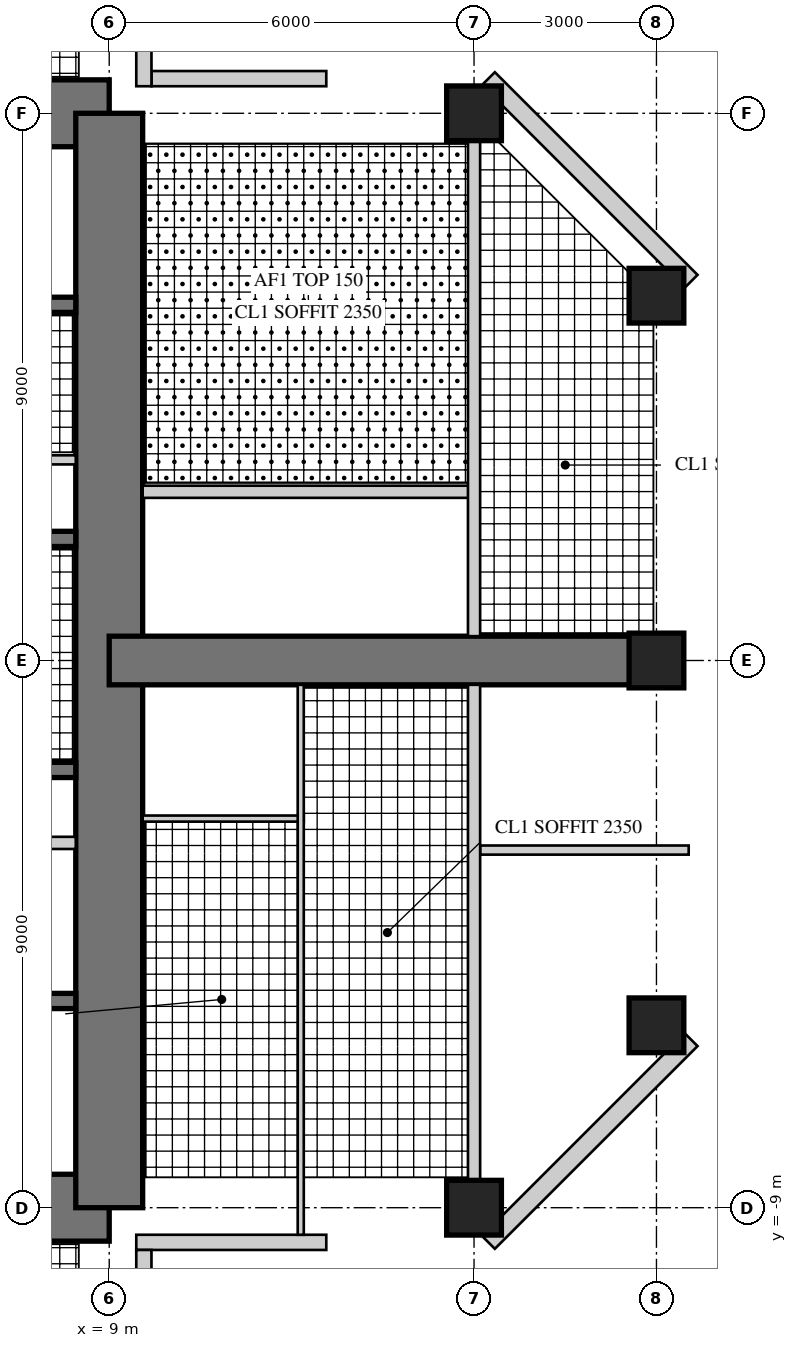
"""IFC4 building model, lengths in metres.
Left out: names, types, materials, properties, quantities, classifications, styles, units other than length and angle.
Written with IfcOpenShell. Run it as: python <this file> out.ifc"""

import sys

from ifc_helpers import new_model, si_unit, direction, frame, frame_2d, origin, origin_2d, place, context, subcontext, project, spatial, rectangle, hollow_rectangle, extrude, element, fill, save


model = new_model("IFC4")
c1 = context("Model", 3, precision=1e-05, world=origin(), true_north=direction((0.0, 1.0)))
c2 = subcontext(c1, "Body", "Model", "MODEL_VIEW")
j1 = project(units=[si_unit("LENGTHUNIT", "METRE"), si_unit("PLANEANGLEUNIT", "RADIAN")], contexts=[c1])
p1 = place(None, origin())
s1 = spatial("IfcSite", under=j1, at=p1, CompositionType="ELEMENT")
p2 = place(p1, origin())
s2 = spatial("IfcBuilding", under=s1, at=p2, CompositionType="ELEMENT")
p3 = place(p2, frame((0.0, 0.0, 206.9)))
s3 = spatial("IfcBuildingStorey", under=s2, at=p3, CompositionType="ELEMENT", Elevation=206.9)
p4 = place(p3, frame((9.0, 9.0, 0.0), z_axis=(0.0, 0.0, 1.0), x_axis=(-1.0, 0.0, 0.0)))
e1 = element("IfcWall", 1, at=p4, inside=s3, PredefinedType="SHEAR", context=c2, shape_type="SweptSolid", body=[
    extrude(rectangle(XDim=18.0, YDim=1.1, at=frame_2d((9.0, 0.0))), origin(), (0.0, 0.0, 1.0), 3.4),
])
p5 = place(p4, frame((9.8, 0.0, 0.0)))
e2 = element("IfcOpeningElement", 2, at=p5, cuts=e1, PredefinedType="OPENING", context=c2, shape_type="SweptSolid", body=[
    extrude(rectangle(XDim=1.0, YDim=2.4, at=frame_2d((0.5, 1.2))), frame((0.0, 0.56, 0.0), z_axis=(0.0, -1.0, 0.0), x_axis=(1.0, 0.0, 0.0)), (0.0, 0.0, 1.0), 1.12),
])
p6 = place(p3, frame((-9.0, -9.0, 0.0), z_axis=(0.0, 0.0, 1.0), x_axis=(1.0, 0.0, 0.0)))
e3 = element("IfcWall", 3, at=p6, inside=s3, PredefinedType="SHEAR", context=c2, shape_type="SweptSolid", body=[
    extrude(rectangle(XDim=18.0, YDim=1.1, at=frame_2d((9.0, 0.0))), origin(), (0.0, 0.0, 1.0), 3.4),
])
p7 = place(p6, frame((9.8, 0.0, 0.0)))
e4 = element("IfcOpeningElement", 4, at=p7, cuts=e3, PredefinedType="OPENING", context=c2, shape_type="SweptSolid", body=[
    extrude(rectangle(XDim=1.0, YDim=2.4, at=frame_2d((0.5, 1.2))), frame((0.0, 0.56, 0.0), z_axis=(0.0, -1.0, 0.0), x_axis=(1.0, 0.0, 0.0)), (0.0, 0.0, 1.0), 1.12),
])
p8 = place(p3, frame((9.0, -9.0, 0.0), z_axis=(0.0, 0.0, 1.0), x_axis=(0.0, 1.0, 0.0)))
e5 = element("IfcWall", 5, at=p8, inside=s3, PredefinedType="SHEAR", context=c2, shape_type="SweptSolid", body=[
    extrude(rectangle(XDim=18.0, YDim=1.1, at=frame_2d((9.0, 0.0))), origin(), (0.0, 0.0, 1.0), 3.4),
])
p9 = place(p8, frame((9.8, 0.0, 0.0)))
e6 = element("IfcOpeningElement", 6, at=p9, cuts=e5, PredefinedType="OPENING", context=c2, shape_type="SweptSolid", body=[
    extrude(rectangle(XDim=1.0, YDim=2.4, at=frame_2d((0.5, 1.2))), frame((0.0, 0.56, 0.0), z_axis=(0.0, -1.0, 0.0), x_axis=(1.0, 0.0, 0.0)), (0.0, 0.0, 1.0), 1.12),
])
p10 = place(p3, frame((1.925, 2.0, 0.0), z_axis=(0.0, 0.0, 1.0), x_axis=(1.0, 0.0, 0.0)))
e7 = element("IfcWall", 7, at=p10, inside=s3, PredefinedType="SHEAR", context=c2, shape_type="SweptSolid", body=[
    extrude(rectangle(XDim=6.525, YDim=0.25, at=frame_2d((3.262, 0.0))), origin(), (0.0, 0.0, 1.0), 3.4),
])
p11 = place(p3, frame((1.925, 5.85, 0.0), z_axis=(0.0, 0.0, 1.0), x_axis=(1.0, 0.0, 0.0)))
e8 = element("IfcWall", 8, at=p11, inside=s3, PredefinedType="SHEAR", context=c2, shape_type="SweptSolid", body=[
    extrude(rectangle(XDim=6.525, YDim=0.25, at=frame_2d((3.262, 0.0))), origin(), (0.0, 0.0, 1.0), 3.4),
])
p12 = place(p11, frame((0.521, 0.0, 0.0)))
e9 = element("IfcOpeningElement", 9, at=p12, cuts=e8, PredefinedType="OPENING", context=c2, shape_type="SweptSolid", body=[
    extrude(rectangle(XDim=1.0, YDim=2.1, at=frame_2d((0.5, 1.05))), frame((0.0, 0.135, 0.0), z_axis=(0.0, -1.0, 0.0), x_axis=(1.0, 0.0, 0.0)), (0.0, 0.0, 1.0), 0.27),
])
p13 = place(p3, frame((1.925, 3.3, 0.0), z_axis=(0.0, 0.0, 1.0), x_axis=(1.0, 0.0, 0.0)))
e10 = element("IfcWall", 10, at=p13, inside=s3, PredefinedType="PARTITIONING", context=c2, shape_type="SweptSolid", body=[
    extrude(rectangle(XDim=6.525, YDim=0.15, at=frame_2d((3.262, 0.0))), origin(), (0.0, 0.0, 1.0), 3.4),
])
p14 = place(p13, frame((0.075, 0.0, 0.0)))
e11 = element("IfcOpeningElement", 11, at=p14, cuts=e10, PredefinedType="OPENING", context=c2, shape_type="SweptSolid", body=[
    extrude(rectangle(XDim=0.8, YDim=2.1, at=frame_2d((0.4, 1.05))), frame((0.0, 0.085, 0.0), z_axis=(0.0, -1.0, 0.0), x_axis=(1.0, 0.0, 0.0)), (0.0, 0.0, 1.0), 0.17),
])
p15 = place(p13, frame((3.675, 0.0, 0.0)))
e12 = element("IfcOpeningElement", 12, at=p15, cuts=e10, PredefinedType="OPENING", context=c2, shape_type="SweptSolid", body=[
    extrude(rectangle(XDim=0.8, YDim=2.1, at=frame_2d((0.4, 1.05))), frame((0.0, 0.085, 0.0), z_axis=(0.0, -1.0, 0.0), x_axis=(1.0, 0.0, 0.0)), (0.0, 0.0, 1.0), 0.17),
])
p16 = place(p3, frame((2.125, -1.8, 0.0), z_axis=(0.0, 0.0, 1.0), x_axis=(1.0, 0.0, 0.0)))
e13 = element("IfcWall", 13, at=p16, inside=s3, PredefinedType="SHEAR", context=c2, shape_type="SweptSolid", body=[
    extrude(rectangle(XDim=6.325, YDim=0.25, at=frame_2d((3.163, 0.0))), origin(), (0.0, 0.0, 1.0), 3.4),
])
p17 = place(p3, frame((2.125, -5.6, 0.0), z_axis=(0.0, 0.0, 1.0), x_axis=(1.0, 0.0, 0.0)))
e14 = element("IfcWall", 14, at=p17, inside=s3, PredefinedType="SHEAR", context=c2, shape_type="SweptSolid", body=[
    extrude(rectangle(XDim=6.325, YDim=0.25, at=frame_2d((3.163, 0.0))), origin(), (0.0, 0.0, 1.0), 3.4),
])
p18 = place(p17, frame((0.175, 0.0, 0.0)))
e15 = element("IfcOpeningElement", 15, at=p18, cuts=e14, PredefinedType="OPENING", context=c2, shape_type="SweptSolid", body=[
    extrude(rectangle(XDim=1.0, YDim=2.1, at=frame_2d((0.5, 1.05))), frame((0.0, 0.135, 0.0), z_axis=(0.0, -1.0, 0.0), x_axis=(1.0, 0.0, 0.0)), (0.0, 0.0, 1.0), 0.27),
])
p19 = place(p3, frame((5.725, -3.0, 0.0), z_axis=(0.0, 0.0, 1.0), x_axis=(1.0, 0.0, 0.0)))
e16 = element("IfcWall", 16, at=p19, inside=s3, PredefinedType="PARTITIONING", context=c2, shape_type="SweptSolid", body=[
    extrude(rectangle(XDim=2.725, YDim=0.2, at=frame_2d((1.362, 0.0))), origin(), (0.0, 0.0, 1.0), 3.4),
])
p20 = place(p3, frame((9.0, 0.0, 0.0), z_axis=(0.0, 0.0, 1.0), x_axis=(1.0, 0.0, 0.0)))
e17 = element("IfcWall", 17, at=p20, inside=s3, PredefinedType="SHEAR", context=c2, shape_type="SweptSolid", body=[
    extrude(rectangle(XDim=9.0, YDim=0.8, at=frame_2d((4.5, 0.0))), origin(), (0.0, 0.0, 1.0), 3.4),
])
p21 = place(p20, frame((3.95, 0.0, 0.0)))
e18 = element("IfcOpeningElement", 18, at=p21, cuts=e17, PredefinedType="OPENING", context=c2, shape_type="SweptSolid", body=[
    extrude(rectangle(XDim=1.0, YDim=2.15, at=frame_2d((0.5, 1.075))), frame((0.0, 0.41, 0.0), z_axis=(0.0, -1.0, 0.0), x_axis=(1.0, 0.0, 0.0)), (0.0, 0.0, 1.0), 0.82),
])
p22 = place(p20, frame((7.0, 0.0, 0.0)))
e19 = element("IfcOpeningElement", 19, at=p22, cuts=e17, PredefinedType="OPENING", context=c2, shape_type="SweptSolid", body=[
    extrude(rectangle(XDim=1.0, YDim=2.2, at=frame_2d((0.5, 1.1))), frame((0.0, 0.41, 0.0), z_axis=(0.0, -1.0, 0.0), x_axis=(1.0, 0.0, 0.0)), (0.0, 0.0, 1.0), 0.82),
])
for number, where, z_axis, x_axis in (
    (20, (15.0, -9.0, 0.0), (0.0, 0.0, 1.0), (1.0, 0.0, 0.0)),
    (21, (15.0, 9.0, 0.0), (0.0, 0.0, 1.0), (1.0, 0.0, 0.0)),
    (22, (18.0, -6.0, 0.0), (0.0, 0.0, 1.0), (1.0, 0.0, 0.0)),
    (23, (18.0, 0.0, 0.0), (0.0, 0.0, 1.0), (1.0, 0.0, 0.0)),
    (24, (18.0, 6.0, 0.0), (0.0, 0.0, 1.0), (1.0, 0.0, 0.0)),
):
    element("IfcColumn", number, at=place(p3, frame(where, z_axis=z_axis, x_axis=x_axis)), inside=s3, PredefinedType="COLUMN", context=c2, shape_type="SweptSolid", body=[
        extrude(rectangle(XDim=0.9, YDim=0.9, at=origin_2d()), origin(), (0.0, 0.0, 1.0), 3.4),
    ])
p23 = place(p3, frame((9.445, -9.57, 0.0), z_axis=(0.0, 0.0, 1.0), x_axis=(1.0, 0.0, 0.0)))
e25 = element("IfcWall", 25, at=p23, inside=s3, PredefinedType="SOLIDWALL", context=c2, shape_type="SweptSolid", body=[
    extrude(rectangle(XDim=3.125, YDim=0.25, at=frame_2d((1.562, 0.0))), origin(), (0.0, 0.0, 1.0), 3.22),
])
p24 = place(p23, frame((0.6, 0.0, 0.0)))
e26 = element("IfcOpeningElement", 26, at=p24, cuts=e25, PredefinedType="OPENING", context=c2, shape_type="SweptSolid", body=[
    extrude(rectangle(XDim=1.0, YDim=2.2, at=frame_2d((0.5, 1.1))), frame((0.0, 0.135, 0.0), z_axis=(0.0, -1.0, 0.0), x_axis=(1.0, 0.0, 0.0)), (0.0, 0.0, 1.0), 0.27),
])
p25 = place(p3, frame((15.236, -9.57, 0.0), z_axis=(0.0, 0.0, 1.0), x_axis=(0.707106781187, 0.707106781187, 0.0)))
e27 = element("IfcWall", 27, at=p25, inside=s3, PredefinedType="SOLIDWALL", context=c2, shape_type="SweptSolid", body=[
    extrude(rectangle(XDim=4.715, YDim=0.3, at=frame_2d((2.357, 0.0))), origin(), (0.0, 0.0, 1.0), 3.22),
])
p26 = place(p25, frame((1.907, 0.0, 0.3)))
e28 = element("IfcOpeningElement", 28, at=p26, cuts=e27, PredefinedType="OPENING", context=c2, shape_type="SweptSolid", body=[
    extrude(rectangle(XDim=0.9, YDim=2.4, at=frame_2d((0.45, 1.2))), frame((0.0, 0.16, 0.0), z_axis=(0.0, -1.0, 0.0), x_axis=(1.0, 0.0, 0.0)), (0.0, 0.0, 1.0), 0.32),
])
p27 = place(p3, frame((18.57, 6.236, 0.0), z_axis=(0.0, 0.0, 1.0), x_axis=(-0.707106781187, 0.707106781187, 0.0)))
e29 = element("IfcWall", 29, at=p27, inside=s3, PredefinedType="SOLIDWALL", context=c2, shape_type="SweptSolid", body=[
    extrude(rectangle(XDim=4.715, YDim=0.3, at=frame_2d((2.357, 0.0))), origin(), (0.0, 0.0, 1.0), 3.22),
])
p28 = place(p27, frame((1.907, 0.0, 0.3)))
e30 = element("IfcOpeningElement", 30, at=p28, cuts=e29, PredefinedType="OPENING", context=c2, shape_type="SweptSolid", body=[
    extrude(rectangle(XDim=0.9, YDim=2.4, at=frame_2d((0.45, 1.2))), frame((0.0, 0.16, 0.0), z_axis=(0.0, -1.0, 0.0), x_axis=(1.0, 0.0, 0.0)), (0.0, 0.0, 1.0), 0.32),
])
p29 = place(p3, frame((12.57, 9.57, 0.0), z_axis=(0.0, 0.0, 1.0), x_axis=(-1.0, 0.0, 0.0)))
e31 = element("IfcWall", 31, at=p29, inside=s3, PredefinedType="SOLIDWALL", context=c2, shape_type="SweptSolid", body=[
    extrude(rectangle(XDim=2.875, YDim=0.25, at=frame_2d((1.438, 0.0))), origin(), (0.0, 0.0, 1.0), 3.22),
])
p30 = place(p29, frame((0.6, 0.0, 0.0)))
e32 = element("IfcOpeningElement", 32, at=p30, cuts=e31, PredefinedType="OPENING", context=c2, shape_type="SweptSolid", body=[
    extrude(rectangle(XDim=1.0, YDim=2.2, at=frame_2d((0.5, 1.1))), frame((0.0, 0.135, 0.0), z_axis=(0.0, -1.0, 0.0), x_axis=(1.0, 0.0, 0.0)), (0.0, 0.0, 1.0), 0.27),
])
p31 = place(p3, frame((9.57, 9.445, 0.0), z_axis=(0.0, 0.0, 1.0), x_axis=(0.0, 1.0, 0.0)))
e33 = element("IfcWall", 33, at=p31, inside=s3, PredefinedType="SOLIDWALL", context=c2, shape_type="SweptSolid", body=[
    extrude(rectangle(XDim=3.125, YDim=0.25, at=frame_2d((1.562, 0.0))), origin(), (0.0, 0.0, 1.0), 3.22),
])
p32 = place(p31, frame((0.6, 0.0, 0.0)))
e34 = element("IfcOpeningElement", 34, at=p32, cuts=e33, PredefinedType="OPENING", context=c2, shape_type="SweptSolid", body=[
    extrude(rectangle(XDim=1.0, YDim=2.2, at=frame_2d((0.5, 1.1))), frame((0.0, 0.135, 0.0), z_axis=(0.0, -1.0, 0.0), x_axis=(1.0, 0.0, 0.0)), (0.0, 0.0, 1.0), 0.27),
])
p33 = place(p3, frame((9.57, -12.57, 0.0), z_axis=(0.0, 0.0, 1.0), x_axis=(0.0, 1.0, 0.0)))
e35 = element("IfcWall", 35, at=p33, inside=s3, PredefinedType="SOLIDWALL", context=c2, shape_type="SweptSolid", body=[
    extrude(rectangle(XDim=2.875, YDim=0.25, at=frame_2d((1.438, 0.0))), origin(), (0.0, 0.0, 1.0), 3.22),
])
p34 = place(p33, frame((0.6, 0.0, 0.0)))
e36 = element("IfcOpeningElement", 36, at=p34, cuts=e35, PredefinedType="OPENING", context=c2, shape_type="SweptSolid", body=[
    extrude(rectangle(XDim=1.0, YDim=2.2, at=frame_2d((0.5, 1.1))), frame((0.0, 0.135, 0.0), z_axis=(0.0, -1.0, 0.0), x_axis=(1.0, 0.0, 0.0)), (0.0, 0.0, 1.0), 0.27),
])
p35 = place(p3, frame((9.55, -2.6, 0.0), z_axis=(0.0, 0.0, 1.0), x_axis=(1.0, 0.0, 0.0)))
e37 = element("IfcWall", 37, at=p35, inside=s3, PredefinedType="PARTITIONING", context=c2, shape_type="SweptSolid", body=[
    extrude(rectangle(XDim=2.65, YDim=0.1, at=frame_2d((1.325, 0.0))), origin(), (0.0, 0.0, 1.0), 3.22),
])
p36 = place(p3, frame((12.15, -9.445, 0.0), z_axis=(0.0, 0.0, 1.0), x_axis=(0.0, 1.0, 0.0)))
e38 = element("IfcWall", 38, at=p36, inside=s3, PredefinedType="PARTITIONING", context=c2, shape_type="SweptSolid", body=[
    extrude(rectangle(XDim=9.045, YDim=0.1, at=frame_2d((4.522, 0.0))), origin(), (0.0, 0.0, 1.0), 3.22),
])
p37 = place(p36, frame((5.495, 0.0, 0.0)))
e39 = element("IfcOpeningElement", 39, at=p37, cuts=e38, PredefinedType="OPENING", context=c2, shape_type="SweptSolid", body=[
    extrude(rectangle(XDim=0.9, YDim=2.1, at=frame_2d((0.45, 1.05))), frame((0.0, 0.06, 0.0), z_axis=(0.0, -1.0, 0.0), x_axis=(1.0, 0.0, 0.0)), (0.0, 0.0, 1.0), 0.12),
])
p38 = place(p36, frame((7.595, 0.0, 0.0)))
e40 = element("IfcOpeningElement", 40, at=p38, cuts=e38, PredefinedType="OPENING", context=c2, shape_type="SweptSolid", body=[
    extrude(rectangle(XDim=0.9, YDim=2.1, at=frame_2d((0.45, 1.05))), frame((0.0, 0.06, 0.0), z_axis=(0.0, -1.0, 0.0), x_axis=(1.0, 0.0, 0.0)), (0.0, 0.0, 1.0), 0.12),
])
p39 = place(p3, frame((9.55, 2.775, 0.0), z_axis=(0.0, 0.0, 1.0), x_axis=(1.0, 0.0, 0.0)))
e41 = element("IfcWall", 41, at=p39, inside=s3, PredefinedType="SOLIDWALL", context=c2, shape_type="SweptSolid", body=[
    extrude(rectangle(XDim=5.45, YDim=0.2, at=frame_2d((2.725, 0.0))), origin(), (0.0, 0.0, 1.0), 3.22),
])
p40 = place(p39, frame((1.2, 0.0, 0.0)))
e42 = element("IfcOpeningElement", 42, at=p40, cuts=e41, PredefinedType="OPENING", context=c2, shape_type="SweptSolid", body=[
    extrude(rectangle(XDim=1.0, YDim=2.2, at=frame_2d((0.5, 1.1))), frame((0.0, 0.11, 0.0), z_axis=(0.0, -1.0, 0.0), x_axis=(1.0, 0.0, 0.0)), (0.0, 0.0, 1.0), 0.22),
])
p41 = place(p3, frame((15.1, -3.118, 0.0), z_axis=(0.0, 0.0, 1.0), x_axis=(1.0, 0.0, 0.0)))
e43 = element("IfcWall", 43, at=p41, inside=s3, PredefinedType="PARTITIONING", context=c2, shape_type="SweptSolid", body=[
    extrude(rectangle(XDim=3.43, YDim=0.15, at=frame_2d((1.715, 0.0))), origin(), (0.0, 0.0, 1.0), 3.22),
])
p42 = place(p41, frame((0.6, 0.0, 0.0)))
e44 = element("IfcOpeningElement", 44, at=p42, cuts=e43, PredefinedType="OPENING", context=c2, shape_type="SweptSolid", body=[
    extrude(rectangle(XDim=1.0, YDim=2.1, at=frame_2d((0.5, 1.05))), frame((0.0, 0.085, 0.0), z_axis=(0.0, -1.0, 0.0), x_axis=(1.0, 0.0, 0.0)), (0.0, 0.0, 1.0), 0.17),
])
p43 = place(p3, frame((15.0, -8.55, 0.0), z_axis=(0.0, 0.0, 1.0), x_axis=(0.0, 1.0, 0.0)))
e45 = element("IfcWall", 45, at=p43, inside=s3, PredefinedType="SOLIDWALL", context=c2, shape_type="SweptSolid", body=[
    extrude(rectangle(XDim=8.15, YDim=0.2, at=frame_2d((4.075, 0.0))), origin(), (0.0, 0.0, 1.0), 2.47),
])
p44 = place(p3, frame((15.0, 0.4, 0.0), z_axis=(0.0, 0.0, 1.0), x_axis=(0.0, 1.0, 0.0)))
e46 = element("IfcWall", 46, at=p44, inside=s3, PredefinedType="SOLIDWALL", context=c2, shape_type="SweptSolid", body=[
    extrude(rectangle(XDim=8.15, YDim=0.2, at=frame_2d((4.075, 0.0))), origin(), (0.0, 0.0, 1.0), 2.47),
])
p45 = place(p44, frame((0.4, 0.0, 0.0)))
e47 = element("IfcOpeningElement", 47, at=p45, cuts=e46, PredefinedType="OPENING", context=c2, shape_type="SweptSolid", body=[
    extrude(rectangle(XDim=1.0, YDim=2.2, at=frame_2d((0.5, 1.1))), frame((0.0, 0.11, 0.0), z_axis=(0.0, -1.0, 0.0), x_axis=(1.0, 0.0, 0.0)), (0.0, 0.0, 1.0), 0.22),
])
p46 = place(p24, origin())
e48 = element("IfcDoor", 48, at=p46, inside=s3, OperationType="SINGLE_SWING_LEFT", PredefinedType="DOOR", context=c2, shape_type="SweptSolid", body=[
    extrude(hollow_rectangle(XDim=1.0, YDim=2.2, WallThickness=0.06, at=frame_2d((0.5, 1.1))), frame((0.0, 0.025, 0.0), z_axis=(0.0, -1.0, 0.0), x_axis=(1.0, 0.0, 0.0)), (0.0, 0.0, 1.0), 0.05),
    extrude(rectangle(XDim=0.879, YDim=2.079, at=frame_2d((0.5, 1.1))), frame((0.0, 0.025, 0.0), z_axis=(0.0, -1.0, 0.0), x_axis=(1.0, 0.0, 0.0)), (0.0, 0.0, 1.0), 0.05),
])
fill(e26, e48)
p47 = place(p26, origin())
e49 = element("IfcWindow", 49, at=p47, inside=s3, PartitioningType="SINGLE_PANEL", PredefinedType="WINDOW", context=c2, shape_type="SweptSolid", body=[
    extrude(hollow_rectangle(XDim=0.9, YDim=2.4, WallThickness=0.06, at=frame_2d((0.45, 1.2))), frame((0.0, 0.03, 0.0), z_axis=(0.0, -1.0, 0.0), x_axis=(1.0, 0.0, 0.0)), (0.0, 0.0, 1.0), 0.06),
    extrude(rectangle(XDim=0.779, YDim=2.279, at=frame_2d((0.45, 1.2))), frame((0.0, 0.03, 0.0), z_axis=(0.0, -1.0, 0.0), x_axis=(1.0, 0.0, 0.0)), (0.0, 0.0, 1.0), 0.06),
])
fill(e28, e49)
p48 = place(p28, origin())
e50 = element("IfcWindow", 50, at=p48, inside=s3, PartitioningType="SINGLE_PANEL", PredefinedType="WINDOW", context=c2, shape_type="SweptSolid", body=[
    extrude(hollow_rectangle(XDim=0.9, YDim=2.4, WallThickness=0.06, at=frame_2d((0.45, 1.2))), frame((0.0, 0.03, 0.0), z_axis=(0.0, -1.0, 0.0), x_axis=(1.0, 0.0, 0.0)), (0.0, 0.0, 1.0), 0.06),
    extrude(rectangle(XDim=0.779, YDim=2.279, at=frame_2d((0.45, 1.2))), frame((0.0, 0.03, 0.0), z_axis=(0.0, -1.0, 0.0), x_axis=(1.0, 0.0, 0.0)), (0.0, 0.0, 1.0), 0.06),
])
fill(e30, e50)
p49 = place(p30, origin())
e51 = element("IfcDoor", 51, at=p49, inside=s3, OperationType="SINGLE_SWING_RIGHT", PredefinedType="DOOR", context=c2, shape_type="SweptSolid", body=[
    extrude(hollow_rectangle(XDim=1.0, YDim=2.2, WallThickness=0.06, at=frame_2d((0.5, 1.1))), frame((0.0, 0.025, 0.0), z_axis=(0.0, -1.0, 0.0), x_axis=(1.0, 0.0, 0.0)), (0.0, 0.0, 1.0), 0.05),
    extrude(rectangle(XDim=0.879, YDim=2.079, at=frame_2d((0.5, 1.1))), frame((0.0, 0.025, 0.0), z_axis=(0.0, -1.0, 0.0), x_axis=(1.0, 0.0, 0.0)), (0.0, 0.0, 1.0), 0.05),
])
fill(e32, e51)
p50 = place(p37, origin())
e52 = element("IfcDoor", 52, at=p50, inside=s3, OperationType="SINGLE_SWING_RIGHT", PredefinedType="DOOR", context=c2, shape_type="SweptSolid", body=[
    extrude(rectangle(XDim=0.9, YDim=2.1, at=frame_2d((0.45, 1.05))), frame((0.0, 0.025, 0.0), z_axis=(0.0, -1.0, 0.0), x_axis=(1.0, 0.0, 0.0)), (0.0, 0.0, 1.0), 0.05),
])
fill(e39, e52)
p51 = place(p38, origin())
e53 = element("IfcDoor", 53, at=p51, inside=s3, OperationType="SINGLE_SWING_RIGHT", PredefinedType="DOOR", context=c2, shape_type="SweptSolid", body=[
    extrude(rectangle(XDim=0.9, YDim=2.1, at=frame_2d((0.45, 1.05))), frame((0.0, 0.025, 0.0), z_axis=(0.0, -1.0, 0.0), x_axis=(1.0, 0.0, 0.0)), (0.0, 0.0, 1.0), 0.05),
])
fill(e40, e53)
p52 = place(p40, origin())
e54 = element("IfcDoor", 54, at=p52, inside=s3, OperationType="SINGLE_SWING_LEFT", PredefinedType="DOOR", context=c2, shape_type="SweptSolid", body=[
    extrude(rectangle(XDim=1.0, YDim=2.2, at=frame_2d((0.5, 1.1))), frame((0.0, 0.025, 0.0), z_axis=(0.0, -1.0, 0.0), x_axis=(1.0, 0.0, 0.0)), (0.0, 0.0, 1.0), 0.05),
])
fill(e42, e54)
p53 = place(p42, origin())
e55 = element("IfcDoor", 55, at=p53, inside=s3, OperationType="SINGLE_SWING_LEFT", PredefinedType="DOOR", context=c2, shape_type="SweptSolid", body=[
    extrude(rectangle(XDim=1.0, YDim=2.1, at=frame_2d((0.5, 1.05))), frame((0.0, 0.025, 0.0), z_axis=(0.0, -1.0, 0.0), x_axis=(1.0, 0.0, 0.0)), (0.0, 0.0, 1.0), 0.05),
])
fill(e44, e55)
p54 = place(p45, frame((1.0, 0.0, 0.0), z_axis=(0.0, 0.0, 1.0), x_axis=(-1.0, 0.0, 0.0)))
e56 = element("IfcDoor", 56, at=p54, inside=s3, OperationType="SINGLE_SWING_RIGHT", PredefinedType="DOOR", context=c2, shape_type="SweptSolid", body=[
    extrude(rectangle(XDim=1.0, YDim=2.2, at=frame_2d((0.5, 1.1))), frame((0.0, 0.025, 0.0), z_axis=(0.0, -1.0, 0.0), x_axis=(1.0, 0.0, 0.0)), (0.0, 0.0, 1.0), 0.05),
])
fill(e47, e56)
p55 = place(p21, frame((1.0, 0.0, 0.0), z_axis=(0.0, 0.0, 1.0), x_axis=(-1.0, 0.0, 0.0)))
e57 = element("IfcDoor", 57, at=p55, inside=s3, OperationType="SINGLE_SWING_RIGHT", PredefinedType="DOOR", context=c2, shape_type="SweptSolid", body=[
    extrude(rectangle(XDim=1.0, YDim=2.15, at=frame_2d((0.5, 1.075))), frame((0.0, 0.025, 0.0), z_axis=(0.0, -1.0, 0.0), x_axis=(1.0, 0.0, 0.0)), (0.0, 0.0, 1.0), 0.05),
])
fill(e18, e57)
p56 = place(p22, frame((1.0, 0.0, 0.0), z_axis=(0.0, 0.0, 1.0), x_axis=(-1.0, 0.0, 0.0)))
e58 = element("IfcDoor", 58, at=p56, inside=s3, OperationType="SINGLE_SWING_RIGHT", PredefinedType="DOOR", context=c2, shape_type="SweptSolid", body=[
    extrude(rectangle(XDim=1.0, YDim=2.2, at=frame_2d((0.5, 1.1))), frame((0.0, 0.025, 0.0), z_axis=(0.0, -1.0, 0.0), x_axis=(1.0, 0.0, 0.0)), (0.0, 0.0, 1.0), 0.05),
])
fill(e19, e58)
p57 = place(p9, origin())
e59 = element("IfcDoor", 59, at=p57, inside=s3, OperationType="SINGLE_SWING_RIGHT", PredefinedType="DOOR", context=c2, shape_type="SweptSolid", body=[
    extrude(rectangle(XDim=1.0, YDim=2.4, at=frame_2d((0.5, 1.2))), frame((0.0, 0.055, 0.0), z_axis=(0.0, -1.0, 0.0), x_axis=(1.0, 0.0, 0.0)), (0.0, 0.0, 1.0), 0.05),
])
fill(e6, e59)
save(model, sys.argv[1])
